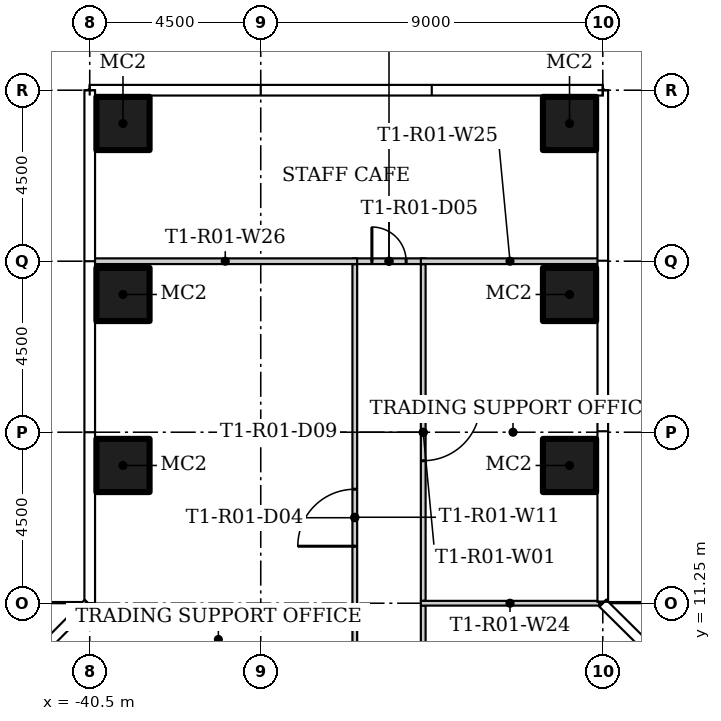
"""IFC4 building model, lengths in metres.
Left out: names, types, materials, properties, quantities, classifications, styles, units other than length and angle.
Written with IfcOpenShell. Run it as: python <this file> out.ifc"""

import sys

from ifc_helpers import new_model, si_unit, direction, frame, frame_2d, origin, origin_2d, place, context, subcontext, project, spatial, rectangle, hollow_rectangle, extrude, element, fill, save


model = new_model("IFC4")
c1 = context("Model", 3, precision=1e-05, world=origin(), true_north=direction((0.0, 1.0)))
c2 = subcontext(c1, "Body", "Model", "MODEL_VIEW")
j1 = project(units=[si_unit("LENGTHUNIT", "METRE"), si_unit("PLANEANGLEUNIT", "RADIAN")], contexts=[c1])
p1 = place(None, origin())
s1 = spatial("IfcSite", under=j1, at=p1, CompositionType="ELEMENT")
p2 = place(p1, origin())
s2 = spatial("IfcBuilding", under=s1, at=p2, CompositionType="ELEMENT")
p3 = place(p2, frame((0.0, 0.0, 28.5)))
s3 = spatial("IfcBuildingStorey", under=s2, at=p3, CompositionType="ELEMENT", Elevation=28.5)
for number, where in (
    (1, (-39.625, 14.875, 0.0)),
    (2, (-39.625, 19.375, 0.0)),
    (3, (-39.625, 23.875, 0.0)),
    (4, (-27.875, 14.875, 0.0)),
    (5, (-27.875, 19.375, 0.0)),
    (6, (-27.875, 23.875, 0.0)),
):
    element("IfcColumn", number, at=place(p3, frame(where)), inside=s3, PredefinedType="COLUMN", context=c2, shape_type="SweptSolid", body=[
        extrude(hollow_rectangle(XDim=1.4, YDim=1.4, WallThickness=0.05, at=origin_2d()), origin(), (0.0, 0.0, 1.0), 4.15),
    ])
p4 = place(p3, frame((-31.725, 20.175, 0.0), z_axis=(0.0, 0.0, 1.0), x_axis=(0.0, -1.0, 0.0)))
e7 = element("IfcWall", 7, at=p4, inside=s3, PredefinedType="PARTITIONING", context=c2, shape_type="SweptSolid", body=[
    extrude(rectangle(XDim=8.863, YDim=0.125, at=frame_2d((4.431, 0.0))), origin(), (0.0, 0.0, 1.0), 4.15),
])
p5 = place(p4, frame((3.675, 0.0, 0.0)))
e8 = element("IfcOpeningElement", 8, at=p5, cuts=e7, PredefinedType="OPENING", context=c2, shape_type="SweptSolid", body=[
    extrude(rectangle(XDim=1.5, YDim=2.1, at=frame_2d((0.75, 1.05))), frame((0.0, 0.073, 0.0), z_axis=(0.0, -1.0, 0.0), x_axis=(1.0, 0.0, 0.0)), (0.0, 0.0, 1.0), 0.145),
])
p6 = place(p3, frame((-33.525, 6.85, 0.0), z_axis=(0.0, 0.0, 1.0), x_axis=(0.0, 1.0, 0.0)))
e9 = element("IfcWall", 9, at=p6, inside=s3, PredefinedType="PARTITIONING", context=c2, shape_type="SweptSolid", body=[
    extrude(rectangle(XDim=13.325, YDim=0.125, at=frame_2d((6.663, 0.0))), origin(), (0.0, 0.0, 1.0), 4.15),
])
p7 = place(p6, frame((5.9, 0.0, 0.0)))
e10 = element("IfcOpeningElement", 10, at=p7, cuts=e9, PredefinedType="OPENING", context=c2, shape_type="SweptSolid", body=[
    extrude(rectangle(XDim=1.5, YDim=2.1, at=frame_2d((0.75, 1.05))), frame((0.0, 0.073, 0.0), z_axis=(0.0, -1.0, 0.0), x_axis=(1.0, 0.0, 0.0)), (0.0, 0.0, 1.0), 0.145),
])
p8 = place(p3, frame((-31.725, 6.812, 0.0), z_axis=(0.0, 0.0, 1.0), x_axis=(0.0, 1.0, 0.0)))
e11 = element("IfcWall", 11, at=p8, inside=s3, PredefinedType="PARTITIONING", context=c2, shape_type="SweptSolid", body=[
    extrude(rectangle(XDim=4.375, YDim=0.125, at=frame_2d((2.188, 0.0))), origin(), (0.0, 0.0, 1.0), 4.15),
])
p9 = place(p8, frame((1.438, 0.0, 0.0)))
e12 = element("IfcOpeningElement", 12, at=p9, cuts=e11, PredefinedType="OPENING", context=c2, shape_type="SweptSolid", body=[
    extrude(rectangle(XDim=1.5, YDim=2.1, at=frame_2d((0.75, 1.05))), frame((0.0, 0.073, 0.0), z_axis=(0.0, -1.0, 0.0), x_axis=(1.0, 0.0, 0.0)), (0.0, 0.0, 1.0), 0.145),
])
p10 = place(p3, frame((-33.588, 20.25, 0.0)))
e13 = element("IfcWall", 13, at=p10, inside=s3, PredefinedType="PARTITIONING", context=c2, shape_type="SweptSolid", body=[
    extrude(rectangle(XDim=1.926, YDim=0.15, at=frame_2d((0.963, 0.0))), origin(), (0.0, 0.0, 1.0), 4.15),
])
p11 = place(p10, frame((0.513, 0.0, 0.0)))
e14 = element("IfcOpeningElement", 14, at=p11, cuts=e13, PredefinedType="OPENING", context=c2, shape_type="SweptSolid", body=[
    extrude(rectangle(XDim=0.9, YDim=2.1, at=frame_2d((0.45, 1.05))), frame((0.0, 0.085, 0.0), z_axis=(0.0, -1.0, 0.0), x_axis=(1.0, 0.0, 0.0)), (0.0, 0.0, 1.0), 0.17),
])
p12 = place(p3, frame((-27.095, 11.25, 0.0), z_axis=(0.0, 0.0, 1.0), x_axis=(-1.0, 0.0, 0.0)))
e15 = element("IfcWall", 15, at=p12, inside=s3, PredefinedType="PARTITIONING", context=c2, shape_type="SweptSolid", body=[
    extrude(rectangle(XDim=4.692, YDim=0.125, at=frame_2d((2.346, 0.0))), origin(), (0.0, 0.0, 1.0), 4.15),
])
p13 = place(p3, frame((-27.095, 20.25, 0.0), z_axis=(0.0, 0.0, 1.0), x_axis=(-1.0, 0.0, 0.0)))
e16 = element("IfcWall", 16, at=p13, inside=s3, PredefinedType="PARTITIONING", context=c2, shape_type="SweptSolid", body=[
    extrude(rectangle(XDim=4.692, YDim=0.15, at=frame_2d((2.346, 0.0))), origin(), (0.0, 0.0, 1.0), 4.15),
])
p14 = place(p3, frame((-33.463, 20.25, 0.0), z_axis=(0.0, 0.0, 1.0), x_axis=(-1.0, 0.0, 0.0)))
e17 = element("IfcWall", 17, at=p14, inside=s3, PredefinedType="PARTITIONING", context=c2, shape_type="SweptSolid", body=[
    extrude(rectangle(XDim=6.942, YDim=0.15, at=frame_2d((3.471, 0.0))), origin(), (0.0, 0.0, 1.0), 4.15),
])
p15 = place(p7, origin())
e18 = element("IfcDoor", 18, at=p15, inside=s3, OperationType="DOUBLE_DOOR_SINGLE_SWING", PredefinedType="DOOR", context=c2, shape_type="SweptSolid", body=[
    extrude(rectangle(XDim=1.5, YDim=2.1, at=frame_2d((0.75, 1.05))), frame((0.0, 0.025, 0.0), z_axis=(0.0, -1.0, 0.0), x_axis=(1.0, 0.0, 0.0)), (0.0, 0.0, 1.0), 0.05),
])
fill(e10, e18)
p16 = place(p11, origin())
e19 = element("IfcDoor", 19, at=p16, inside=s3, OperationType="SINGLE_SWING_LEFT", PredefinedType="DOOR", context=c2, shape_type="SweptSolid", body=[
    extrude(rectangle(XDim=0.9, YDim=2.1, at=frame_2d((0.45, 1.05))), frame((0.0, 0.025, 0.0), z_axis=(0.0, -1.0, 0.0), x_axis=(1.0, 0.0, 0.0)), (0.0, 0.0, 1.0), 0.05),
])
fill(e14, e19)
p17 = place(p5, origin())
e20 = element("IfcDoor", 20, at=p17, inside=s3, OperationType="DOUBLE_DOOR_SINGLE_SWING", PredefinedType="DOOR", context=c2, shape_type="SweptSolid", body=[
    extrude(rectangle(XDim=1.5, YDim=2.1, at=frame_2d((0.75, 1.05))), frame((0.0, 0.025, 0.0), z_axis=(0.0, -1.0, 0.0), x_axis=(1.0, 0.0, 0.0)), (0.0, 0.0, 1.0), 0.05),
])
fill(e8, e20)
save(model, sys.argv[1])
